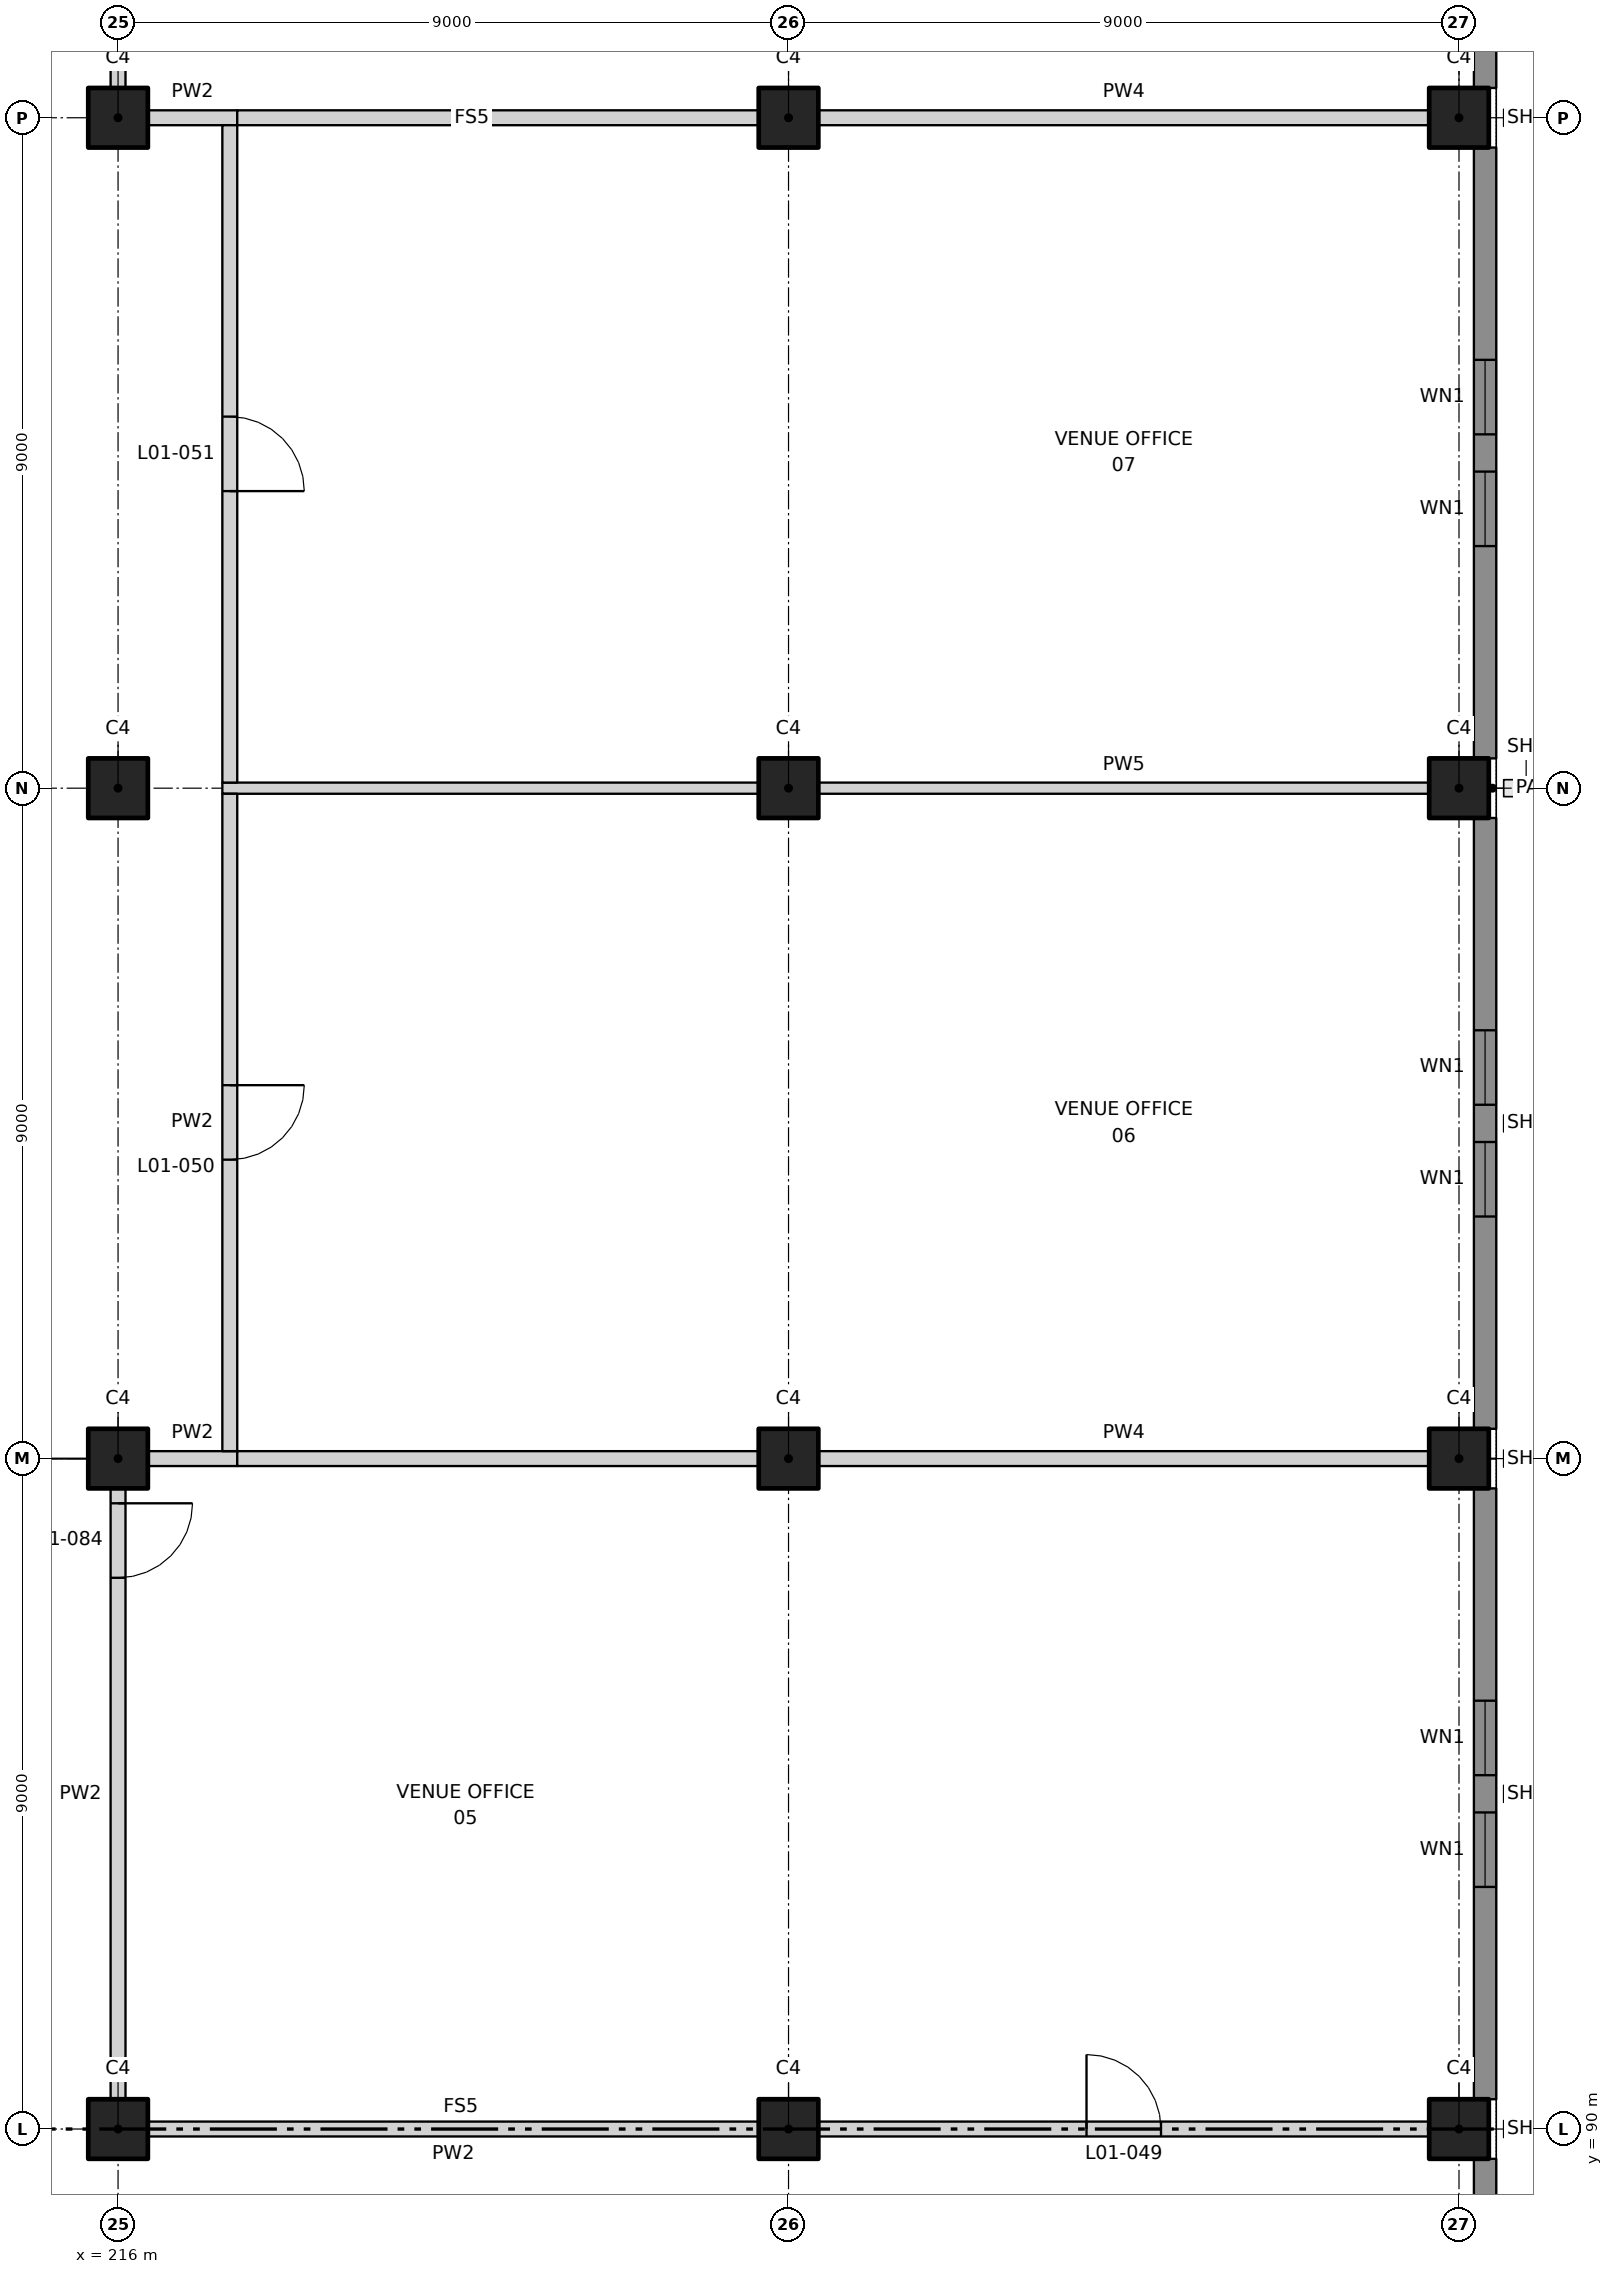
"""IFC4 building model, lengths in metres.
Left out: names, types, materials, properties, quantities, classifications, styles, units other than length and angle.
Written with IfcOpenShell. Run it as: python <this file> out.ifc"""

import sys

from ifc_helpers import new_model, si_unit, direction, frame, frame_2d, origin, origin_2d, place, context, subcontext, project, spatial, rectangle, extrude, element, fill, save


model = new_model("IFC4")
c1 = context("Model", 3, precision=1e-05, world=origin(), true_north=direction((0.0, 1.0)))
c2 = subcontext(c1, "Body", "Model", "MODEL_VIEW")
j1 = project(units=[si_unit("LENGTHUNIT", "METRE"), si_unit("PLANEANGLEUNIT", "RADIAN")], contexts=[c1])
p1 = place(None, origin())
s1 = spatial("IfcSite", under=j1, at=p1, CompositionType="ELEMENT")
p2 = place(p1, origin())
s2 = spatial("IfcBuilding", under=s1, at=p2, CompositionType="ELEMENT")
p3 = place(p2, frame((0.0, 0.0, 7.0)))
s3 = spatial("IfcBuildingStorey", under=s2, at=p3, CompositionType="ELEMENT", Elevation=7.0)
for number, where, z_axis, x_axis in (
    (1, (216.0, 90.0, 0.0), (0.0, 0.0, 1.0), (1.0, 0.0, 0.0)),
    (2, (216.0, 99.0, 0.0), (0.0, 0.0, 1.0), (1.0, 0.0, 0.0)),
    (3, (216.0, 108.0, 0.0), (0.0, 0.0, 1.0), (1.0, 0.0, 0.0)),
    (4, (216.0, 117.0, 0.0), (0.0, 0.0, 1.0), (1.0, 0.0, 0.0)),
    (5, (225.0, 90.0, 0.0), (0.0, 0.0, 1.0), (1.0, 0.0, 0.0)),
    (6, (225.0, 99.0, 0.0), (0.0, 0.0, 1.0), (1.0, 0.0, 0.0)),
    (7, (225.0, 108.0, 0.0), (0.0, 0.0, 1.0), (1.0, 0.0, 0.0)),
    (8, (225.0, 117.0, 0.0), (0.0, 0.0, 1.0), (1.0, 0.0, 0.0)),
    (9, (234.0, 90.0, 0.0), (0.0, 0.0, 1.0), (1.0, 0.0, 0.0)),
    (10, (234.0, 99.0, 0.0), (0.0, 0.0, 1.0), (1.0, 0.0, 0.0)),
    (11, (234.0, 108.0, 0.0), (0.0, 0.0, 1.0), (1.0, 0.0, 0.0)),
    (12, (234.0, 117.0, 0.0), (0.0, 0.0, 1.0), (1.0, 0.0, 0.0)),
):
    element("IfcColumn", number, at=place(p3, frame(where, z_axis=z_axis, x_axis=x_axis)), inside=s3, PredefinedType="COLUMN", context=c2, shape_type="SweptSolid", body=[
        extrude(rectangle(XDim=0.8, YDim=0.8, at=origin_2d()), origin(), (0.0, 0.0, 1.0), 4.5),
    ])
p4 = place(p3, frame((225.4, 90.0, 0.0), z_axis=(0.0, 0.0, 1.0), x_axis=(1.0, 0.0, 0.0)))
e13 = element("IfcWall", 13, at=p4, inside=s3, PredefinedType="PARTITIONING", context=c2, shape_type="SweptSolid", body=[
    extrude(rectangle(XDim=8.2, YDim=0.2, at=frame_2d((4.1, 0.0))), origin(), (0.0, 0.0, 1.0), 3.25),
])
p5 = place(p4, frame((3.6, 0.0, 0.0)))
e14 = element("IfcOpeningElement", 14, at=p5, cuts=e13, PredefinedType="OPENING", context=c2, shape_type="SweptSolid", body=[
    extrude(rectangle(XDim=1.0, YDim=2.1, at=frame_2d((0.5, 1.05))), frame((0.0, 0.11, 0.0), z_axis=(0.0, -1.0, 0.0), x_axis=(1.0, 0.0, 0.0)), (0.0, 0.0, 1.0), 0.22),
])
p6 = place(p3, frame((216.4, 90.0, 0.0), z_axis=(0.0, 0.0, 1.0), x_axis=(1.0, 0.0, 0.0)))
e15 = element("IfcWall", 15, at=p6, inside=s3, PredefinedType="PARTITIONING", context=c2, shape_type="SweptSolid", body=[
    extrude(rectangle(XDim=8.2, YDim=0.2, at=frame_2d((4.1, 0.0))), origin(), (0.0, 0.0, 1.0), 3.25),
])
p7 = place(p3, frame((216.4, 99.0, 0.0), z_axis=(0.0, 0.0, 1.0), x_axis=(1.0, 0.0, 0.0)))
e16 = element("IfcWall", 16, at=p7, inside=s3, PredefinedType="PARTITIONING", context=c2, shape_type="SweptSolid", body=[
    extrude(rectangle(XDim=1.2, YDim=0.2, at=frame_2d((0.6, 0.0))), origin(), (0.0, 0.0, 1.0), 3.25),
])
p8 = place(p3, frame((225.4, 99.0, 0.0), z_axis=(0.0, 0.0, 1.0), x_axis=(1.0, 0.0, 0.0)))
e17 = element("IfcWall", 17, at=p8, inside=s3, PredefinedType="PARTITIONING", context=c2, shape_type="SweptSolid", body=[
    extrude(rectangle(XDim=8.2, YDim=0.2, at=frame_2d((4.1, 0.0))), origin(), (0.0, 0.0, 1.0), 3.25),
])
p9 = place(p3, frame((217.6, 99.0, 0.0), z_axis=(0.0, 0.0, 1.0), x_axis=(1.0, 0.0, 0.0)))
e18 = element("IfcWall", 18, at=p9, inside=s3, PredefinedType="PARTITIONING", context=c2, shape_type="SweptSolid", body=[
    extrude(rectangle(XDim=7.0, YDim=0.2, at=frame_2d((3.5, 0.0))), origin(), (0.0, 0.0, 1.0), 3.25),
])
p10 = place(p3, frame((225.4, 108.0, 0.0), z_axis=(0.0, 0.0, 1.0), x_axis=(1.0, 0.0, 0.0)))
e19 = element("IfcWall", 19, at=p10, inside=s3, PredefinedType="PARTITIONING", context=c2, shape_type="SweptSolid", body=[
    extrude(rectangle(XDim=8.2, YDim=0.15, at=frame_2d((4.1, 0.0))), origin(), (0.0, 0.0, 1.0), 3.25),
])
p11 = place(p3, frame((217.4, 108.0, 0.0), z_axis=(0.0, 0.0, 1.0), x_axis=(1.0, 0.0, 0.0)))
e20 = element("IfcWall", 20, at=p11, inside=s3, PredefinedType="PARTITIONING", context=c2, shape_type="SweptSolid", body=[
    extrude(rectangle(XDim=7.2, YDim=0.15, at=frame_2d((3.6, 0.0))), origin(), (0.0, 0.0, 1.0), 3.25),
])
p12 = place(p3, frame((216.4, 117.0, 0.0), z_axis=(0.0, 0.0, 1.0), x_axis=(1.0, 0.0, 0.0)))
e21 = element("IfcWall", 21, at=p12, inside=s3, PredefinedType="PARTITIONING", context=c2, shape_type="SweptSolid", body=[
    extrude(rectangle(XDim=1.2, YDim=0.2, at=frame_2d((0.6, 0.0))), origin(), (0.0, 0.0, 1.0), 3.25),
])
p13 = place(p3, frame((225.4, 117.0, 0.0), z_axis=(0.0, 0.0, 1.0), x_axis=(1.0, 0.0, 0.0)))
e22 = element("IfcWall", 22, at=p13, inside=s3, PredefinedType="PARTITIONING", context=c2, shape_type="SweptSolid", body=[
    extrude(rectangle(XDim=8.2, YDim=0.2, at=frame_2d((4.1, 0.0))), origin(), (0.0, 0.0, 1.0), 3.25),
])
p14 = place(p3, frame((217.6, 117.0, 0.0), z_axis=(0.0, 0.0, 1.0), x_axis=(1.0, 0.0, 0.0)))
e23 = element("IfcWall", 23, at=p14, inside=s3, PredefinedType="PARTITIONING", context=c2, shape_type="SweptSolid", body=[
    extrude(rectangle(XDim=7.0, YDim=0.2, at=frame_2d((3.5, 0.0))), origin(), (0.0, 0.0, 1.0), 3.25),
])
p15 = place(p3, frame((216.0, 90.4, 0.0), z_axis=(0.0, 0.0, 1.0), x_axis=(0.0, 1.0, 0.0)))
e24 = element("IfcWall", 24, at=p15, inside=s3, PredefinedType="PARTITIONING", context=c2, shape_type="SweptSolid", body=[
    extrude(rectangle(XDim=8.2, YDim=0.2, at=frame_2d((4.1, 0.0))), origin(), (0.0, 0.0, 1.0), 3.25),
])
p16 = place(p15, frame((7.0, 0.0, 0.0)))
e25 = element("IfcOpeningElement", 25, at=p16, cuts=e24, PredefinedType="OPENING", context=c2, shape_type="SweptSolid", body=[
    extrude(rectangle(XDim=1.0, YDim=2.1, at=frame_2d((0.5, 1.05))), frame((0.0, 0.11, 0.0), z_axis=(0.0, -1.0, 0.0), x_axis=(1.0, 0.0, 0.0)), (0.0, 0.0, 1.0), 0.22),
])
p17 = place(p3, frame((216.0, 117.4, 0.0), z_axis=(0.0, 0.0, 1.0), x_axis=(0.0, 1.0, 0.0)))
e26 = element("IfcWall", 26, at=p17, inside=s3, PredefinedType="PARTITIONING", context=c2, shape_type="SweptSolid", body=[
    extrude(rectangle(XDim=8.2, YDim=0.2, at=frame_2d((4.1, 0.0))), origin(), (0.0, 0.0, 1.0), 3.25),
])
p18 = place(p3, frame((217.5, 99.1, 0.0), z_axis=(0.0, 0.0, 1.0), x_axis=(0.0, 1.0, 0.0)))
e27 = element("IfcWall", 27, at=p18, inside=s3, PredefinedType="PARTITIONING", context=c2, shape_type="SweptSolid", body=[
    extrude(rectangle(XDim=8.825, YDim=0.2, at=frame_2d((4.413, 0.0))), origin(), (0.0, 0.0, 1.0), 4.5),
])
p19 = place(p18, frame((3.913, 0.0, 0.0)))
e28 = element("IfcOpeningElement", 28, at=p19, cuts=e27, PredefinedType="OPENING", context=c2, shape_type="SweptSolid", body=[
    extrude(rectangle(XDim=1.0, YDim=2.1, at=frame_2d((0.5, 1.05))), frame((0.0, 0.11, 0.0), z_axis=(0.0, -1.0, 0.0), x_axis=(1.0, 0.0, 0.0)), (0.0, 0.0, 1.0), 0.22),
])
p20 = place(p3, frame((217.5, 108.075, 0.0), z_axis=(0.0, 0.0, 1.0), x_axis=(0.0, 1.0, 0.0)))
e29 = element("IfcWall", 29, at=p20, inside=s3, PredefinedType="PARTITIONING", context=c2, shape_type="SweptSolid", body=[
    extrude(rectangle(XDim=8.825, YDim=0.2, at=frame_2d((4.413, 0.0))), origin(), (0.0, 0.0, 1.0), 4.5),
])
p21 = place(p20, frame((3.913, 0.0, 0.0)))
e30 = element("IfcOpeningElement", 30, at=p21, cuts=e29, PredefinedType="OPENING", context=c2, shape_type="SweptSolid", body=[
    extrude(rectangle(XDim=1.0, YDim=2.1, at=frame_2d((0.5, 1.05))), frame((0.0, 0.11, 0.0), z_axis=(0.0, -1.0, 0.0), x_axis=(1.0, 0.0, 0.0)), (0.0, 0.0, 1.0), 0.22),
])
p22 = place(p3, frame((234.35, 81.4, 0.0), z_axis=(0.0, 0.0, 1.0), x_axis=(0.0, 1.0, 0.0)))
e31 = element("IfcWall", 31, at=p22, inside=s3, PredefinedType="SOLIDWALL", context=c2, shape_type="SweptSolid", body=[
    extrude(rectangle(XDim=8.2, YDim=0.3, at=frame_2d((4.1, 0.0))), origin(), (0.0, 0.0, 1.0), 4.5),
])
p23 = place(p3, frame((234.35, 90.4, 0.0), z_axis=(0.0, 0.0, 1.0), x_axis=(0.0, 1.0, 0.0)))
e32 = element("IfcWall", 32, at=p23, inside=s3, PredefinedType="SOLIDWALL", context=c2, shape_type="SweptSolid", body=[
    extrude(rectangle(XDim=8.2, YDim=0.3, at=frame_2d((4.1, 0.0))), origin(), (0.0, 0.0, 1.0), 4.5),
])
p24 = place(p23, frame((2.85, 0.0, 0.9)))
e33 = element("IfcOpeningElement", 33, at=p24, cuts=e32, PredefinedType="OPENING", context=c2, shape_type="SweptSolid", body=[
    extrude(rectangle(XDim=1.0, YDim=2.1, at=frame_2d((0.5, 1.05))), frame((0.0, 0.16, 0.0), z_axis=(0.0, -1.0, 0.0), x_axis=(1.0, 0.0, 0.0)), (0.0, 0.0, 1.0), 0.32),
])
p25 = place(p23, frame((4.35, 0.0, 0.9)))
e34 = element("IfcOpeningElement", 34, at=p25, cuts=e32, PredefinedType="OPENING", context=c2, shape_type="SweptSolid", body=[
    extrude(rectangle(XDim=1.0, YDim=2.1, at=frame_2d((0.5, 1.05))), frame((0.0, 0.16, 0.0), z_axis=(0.0, -1.0, 0.0), x_axis=(1.0, 0.0, 0.0)), (0.0, 0.0, 1.0), 0.32),
])
p26 = place(p3, frame((234.35, 99.4, 0.0), z_axis=(0.0, 0.0, 1.0), x_axis=(0.0, 1.0, 0.0)))
e35 = element("IfcWall", 35, at=p26, inside=s3, PredefinedType="SOLIDWALL", context=c2, shape_type="SweptSolid", body=[
    extrude(rectangle(XDim=8.2, YDim=0.3, at=frame_2d((4.1, 0.0))), origin(), (0.0, 0.0, 1.0), 4.5),
])
p27 = place(p26, frame((2.85, 0.0, 0.9)))
e36 = element("IfcOpeningElement", 36, at=p27, cuts=e35, PredefinedType="OPENING", context=c2, shape_type="SweptSolid", body=[
    extrude(rectangle(XDim=1.0, YDim=2.1, at=frame_2d((0.5, 1.05))), frame((0.0, 0.16, 0.0), z_axis=(0.0, -1.0, 0.0), x_axis=(1.0, 0.0, 0.0)), (0.0, 0.0, 1.0), 0.32),
])
p28 = place(p26, frame((4.35, 0.0, 0.9)))
e37 = element("IfcOpeningElement", 37, at=p28, cuts=e35, PredefinedType="OPENING", context=c2, shape_type="SweptSolid", body=[
    extrude(rectangle(XDim=1.0, YDim=2.1, at=frame_2d((0.5, 1.05))), frame((0.0, 0.16, 0.0), z_axis=(0.0, -1.0, 0.0), x_axis=(1.0, 0.0, 0.0)), (0.0, 0.0, 1.0), 0.32),
])
p29 = place(p3, frame((234.35, 108.4, 0.0), z_axis=(0.0, 0.0, 1.0), x_axis=(0.0, 1.0, 0.0)))
e38 = element("IfcWall", 38, at=p29, inside=s3, PredefinedType="SOLIDWALL", context=c2, shape_type="SweptSolid", body=[
    extrude(rectangle(XDim=8.2, YDim=0.3, at=frame_2d((4.1, 0.0))), origin(), (0.0, 0.0, 1.0), 4.5),
])
p30 = place(p29, frame((2.85, 0.0, 0.9)))
e39 = element("IfcOpeningElement", 39, at=p30, cuts=e38, PredefinedType="OPENING", context=c2, shape_type="SweptSolid", body=[
    extrude(rectangle(XDim=1.0, YDim=2.1, at=frame_2d((0.5, 1.05))), frame((0.0, 0.16, 0.0), z_axis=(0.0, -1.0, 0.0), x_axis=(1.0, 0.0, 0.0)), (0.0, 0.0, 1.0), 0.32),
])
p31 = place(p29, frame((4.35, 0.0, 0.9)))
e40 = element("IfcOpeningElement", 40, at=p31, cuts=e38, PredefinedType="OPENING", context=c2, shape_type="SweptSolid", body=[
    extrude(rectangle(XDim=1.0, YDim=2.1, at=frame_2d((0.5, 1.05))), frame((0.0, 0.16, 0.0), z_axis=(0.0, -1.0, 0.0), x_axis=(1.0, 0.0, 0.0)), (0.0, 0.0, 1.0), 0.32),
])
p32 = place(p3, frame((234.35, 117.4, 0.0), z_axis=(0.0, 0.0, 1.0), x_axis=(0.0, 1.0, 0.0)))
e41 = element("IfcWall", 41, at=p32, inside=s3, PredefinedType="SOLIDWALL", context=c2, shape_type="SweptSolid", body=[
    extrude(rectangle(XDim=8.6, YDim=0.3, at=frame_2d((4.3, 0.0))), origin(), (0.0, 0.0, 1.0), 4.5),
])
p33 = place(p32, frame((2.85, 0.0, 0.9)))
e42 = element("IfcOpeningElement", 42, at=p33, cuts=e41, PredefinedType="OPENING", context=c2, shape_type="SweptSolid", body=[
    extrude(rectangle(XDim=1.0, YDim=2.1, at=frame_2d((0.5, 1.05))), frame((0.0, 0.16, 0.0), z_axis=(0.0, -1.0, 0.0), x_axis=(1.0, 0.0, 0.0)), (0.0, 0.0, 1.0), 0.32),
])
p34 = place(p32, frame((4.35, 0.0, 0.9)))
e43 = element("IfcOpeningElement", 43, at=p34, cuts=e41, PredefinedType="OPENING", context=c2, shape_type="SweptSolid", body=[
    extrude(rectangle(XDim=1.0, YDim=2.1, at=frame_2d((0.5, 1.05))), frame((0.0, 0.16, 0.0), z_axis=(0.0, -1.0, 0.0), x_axis=(1.0, 0.0, 0.0)), (0.0, 0.0, 1.0), 0.32),
])
p35 = place(p5, origin())
e44 = element("IfcDoor", 44, at=p35, inside=s3, OperationType="SINGLE_SWING_LEFT", PredefinedType="DOOR", context=c2, shape_type="SweptSolid", body=[
    extrude(rectangle(XDim=1.0, YDim=2.1, at=frame_2d((0.5, 1.05))), frame((0.0, 0.025, 0.0), z_axis=(0.0, -1.0, 0.0), x_axis=(1.0, 0.0, 0.0)), (0.0, 0.0, 1.0), 0.05),
])
fill(e14, e44)
p36 = place(p19, frame((1.0, 0.0, 0.0), z_axis=(0.0, 0.0, 1.0), x_axis=(-1.0, 0.0, 0.0)))
e45 = element("IfcDoor", 45, at=p36, inside=s3, OperationType="SINGLE_SWING_LEFT", PredefinedType="DOOR", context=c2, shape_type="SweptSolid", body=[
    extrude(rectangle(XDim=1.0, YDim=2.1, at=frame_2d((0.5, 1.05))), frame((0.0, 0.025, 0.0), z_axis=(0.0, -1.0, 0.0), x_axis=(1.0, 0.0, 0.0)), (0.0, 0.0, 1.0), 0.05),
])
fill(e28, e45)
p37 = place(p21, frame((1.0, 0.0, 0.0), z_axis=(0.0, 0.0, 1.0), x_axis=(-1.0, 0.0, 0.0)))
e46 = element("IfcDoor", 46, at=p37, inside=s3, OperationType="SINGLE_SWING_RIGHT", PredefinedType="DOOR", context=c2, shape_type="SweptSolid", body=[
    extrude(rectangle(XDim=1.0, YDim=2.1, at=frame_2d((0.5, 1.05))), frame((0.0, 0.025, 0.0), z_axis=(0.0, -1.0, 0.0), x_axis=(1.0, 0.0, 0.0)), (0.0, 0.0, 1.0), 0.05),
])
fill(e30, e46)
p38 = place(p16, frame((1.0, 0.0, 0.0), z_axis=(0.0, 0.0, 1.0), x_axis=(-1.0, 0.0, 0.0)))
e47 = element("IfcDoor", 47, at=p38, inside=s3, OperationType="SINGLE_SWING_LEFT", PredefinedType="DOOR", context=c2, shape_type="SweptSolid", body=[
    extrude(rectangle(XDim=1.0, YDim=2.1, at=frame_2d((0.5, 1.05))), frame((0.0, 0.025, 0.0), z_axis=(0.0, -1.0, 0.0), x_axis=(1.0, 0.0, 0.0)), (0.0, 0.0, 1.0), 0.05),
])
fill(e25, e47)
p39 = place(p24, origin())
e48 = element("IfcWindow", 48, at=p39, inside=s3, PartitioningType="SINGLE_PANEL", PredefinedType="WINDOW", context=c2, shape_type="SweptSolid", body=[
    extrude(rectangle(XDim=1.0, YDim=2.1, at=frame_2d((0.5, 1.05))), frame((0.0, 0.03, 0.0), z_axis=(0.0, -1.0, 0.0), x_axis=(1.0, 0.0, 0.0)), (0.0, 0.0, 1.0), 0.06),
])
fill(e33, e48)
p40 = place(p25, origin())
e49 = element("IfcWindow", 49, at=p40, inside=s3, PartitioningType="SINGLE_PANEL", PredefinedType="WINDOW", context=c2, shape_type="SweptSolid", body=[
    extrude(rectangle(XDim=1.0, YDim=2.1, at=frame_2d((0.5, 1.05))), frame((0.0, 0.03, 0.0), z_axis=(0.0, -1.0, 0.0), x_axis=(1.0, 0.0, 0.0)), (0.0, 0.0, 1.0), 0.06),
])
fill(e34, e49)
p41 = place(p27, origin())
e50 = element("IfcWindow", 50, at=p41, inside=s3, PartitioningType="SINGLE_PANEL", PredefinedType="WINDOW", context=c2, shape_type="SweptSolid", body=[
    extrude(rectangle(XDim=1.0, YDim=2.1, at=frame_2d((0.5, 1.05))), frame((0.0, 0.03, 0.0), z_axis=(0.0, -1.0, 0.0), x_axis=(1.0, 0.0, 0.0)), (0.0, 0.0, 1.0), 0.06),
])
fill(e36, e50)
p42 = place(p28, origin())
e51 = element("IfcWindow", 51, at=p42, inside=s3, PartitioningType="SINGLE_PANEL", PredefinedType="WINDOW", context=c2, shape_type="SweptSolid", body=[
    extrude(rectangle(XDim=1.0, YDim=2.1, at=frame_2d((0.5, 1.05))), frame((0.0, 0.03, 0.0), z_axis=(0.0, -1.0, 0.0), x_axis=(1.0, 0.0, 0.0)), (0.0, 0.0, 1.0), 0.06),
])
fill(e37, e51)
p43 = place(p30, origin())
e52 = element("IfcWindow", 52, at=p43, inside=s3, PartitioningType="SINGLE_PANEL", PredefinedType="WINDOW", context=c2, shape_type="SweptSolid", body=[
    extrude(rectangle(XDim=1.0, YDim=2.1, at=frame_2d((0.5, 1.05))), frame((0.0, 0.03, 0.0), z_axis=(0.0, -1.0, 0.0), x_axis=(1.0, 0.0, 0.0)), (0.0, 0.0, 1.0), 0.06),
])
fill(e39, e52)
p44 = place(p31, origin())
e53 = element("IfcWindow", 53, at=p44, inside=s3, PartitioningType="SINGLE_PANEL", PredefinedType="WINDOW", context=c2, shape_type="SweptSolid", body=[
    extrude(rectangle(XDim=1.0, YDim=2.1, at=frame_2d((0.5, 1.05))), frame((0.0, 0.03, 0.0), z_axis=(0.0, -1.0, 0.0), x_axis=(1.0, 0.0, 0.0)), (0.0, 0.0, 1.0), 0.06),
])
fill(e40, e53)
save(model, sys.argv[1])
